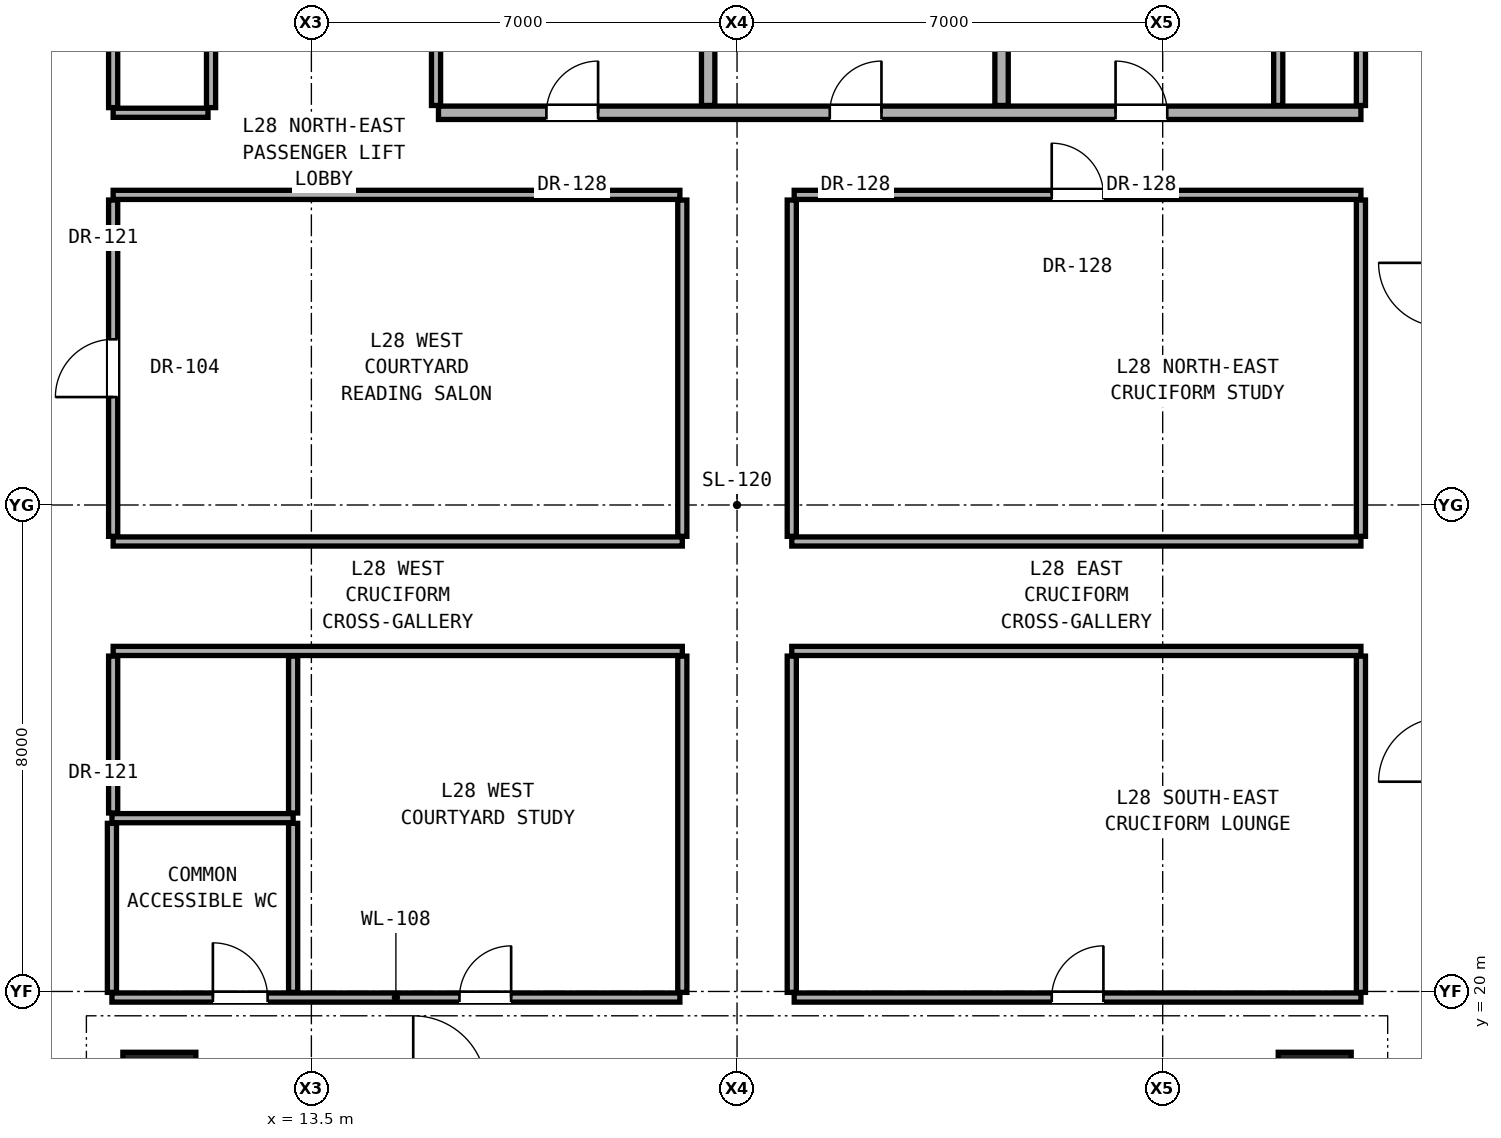
"""IFC4 building model, lengths in metres.
Left out: names, types, materials, properties, quantities, classifications, styles, units other than length and angle.
Written with IfcOpenShell. Run it as: python <this file> out.ifc"""

import sys

from ifc_helpers import new_model, si_unit, direction, frame, frame_2d, origin, origin_2d, place, context, subcontext, project, spatial, rectangle, extrude, element, fill, save


model = new_model("IFC4")
c1 = context("Model", 3, precision=1e-05, world=origin(), true_north=direction((0.0, 1.0)))
c2 = subcontext(c1, "Body", "Model", "MODEL_VIEW")
j1 = project(units=[si_unit("LENGTHUNIT", "METRE"), si_unit("PLANEANGLEUNIT", "RADIAN")], contexts=[c1])
p1 = place(None, origin())
s1 = spatial("IfcSite", under=j1, at=p1, CompositionType="ELEMENT")
p2 = place(p1, origin())
s2 = spatial("IfcBuilding", under=s1, at=p2, CompositionType="ELEMENT")
p3 = place(p2, frame((0.0, 0.0, 101.6)))
s3 = spatial("IfcBuildingStorey", under=s2, at=p3, CompositionType="ELEMENT", Elevation=101.6)
for number, where, z_axis, x_axis in (
    (1, (11.0, 18.4, 0.0), (0.0, 0.0, 1.0), (1.0, 0.0, 0.0)),
    (2, (30.0, 18.4, 0.0), (0.0, 0.0, 1.0), (1.0, 0.0, 0.0)),
):
    element("IfcColumn", number, at=place(p3, frame(where, z_axis=z_axis, x_axis=x_axis)), inside=s3, PredefinedType="COLUMN", context=c2, shape_type="SweptSolid", body=[
        extrude(rectangle(XDim=1.2, YDim=1.2, at=origin_2d()), origin(), (0.0, 0.0, 1.0), 3.3),
    ])
p4 = place(p3, frame((10.22, 19.9, 0.0), z_axis=(0.0, 0.0, 1.0), x_axis=(1.0, 0.0, 0.0)))
e3 = element("IfcWall", 3, at=p4, inside=s3, PredefinedType="PARTITIONING", context=c2, shape_type="SweptSolid", body=[
    extrude(rectangle(XDim=9.34, YDim=0.15, at=frame_2d((4.67, 0.0))), origin(), (0.0, 0.0, 1.0), 2.124),
])
p5 = place(p4, frame((1.66, 0.0, 0.0)))
e4 = element("IfcOpeningElement", 4, at=p5, cuts=e3, PredefinedType="OPENING", context=c2, shape_type="SweptSolid", body=[
    extrude(rectangle(XDim=0.9, YDim=2.1, at=frame_2d((0.45, 1.05))), frame((0.0, 0.085, 0.0), z_axis=(0.0, -1.0, 0.0), x_axis=(1.0, 0.0, 0.0)), (0.0, 0.0, 1.0), 0.17),
])
p6 = place(p4, frame((5.715, 0.0, 0.0)))
e5 = element("IfcOpeningElement", 5, at=p6, cuts=e3, PredefinedType="OPENING", context=c2, shape_type="SweptSolid", body=[
    extrude(rectangle(XDim=0.85, YDim=2.01, at=frame_2d((0.425, 1.005))), frame((0.0, 0.085, 0.0), z_axis=(0.0, -1.0, 0.0), x_axis=(1.0, 0.0, 0.0)), (0.0, 0.0, 1.0), 0.17),
])
p7 = place(p3, frame((21.44, 19.9, 0.0), z_axis=(0.0, 0.0, 1.0), x_axis=(1.0, 0.0, 0.0)))
e6 = element("IfcWall", 6, at=p7, inside=s3, PredefinedType="PARTITIONING", context=c2, shape_type="SweptSolid", body=[
    extrude(rectangle(XDim=9.32, YDim=0.15, at=frame_2d((4.66, 0.0))), origin(), (0.0, 0.0, 1.0), 2.124),
])
p8 = place(p7, frame((4.235, 0.0, 0.0)))
e7 = element("IfcOpeningElement", 7, at=p8, cuts=e6, PredefinedType="OPENING", context=c2, shape_type="SweptSolid", body=[
    extrude(rectangle(XDim=0.85, YDim=2.01, at=frame_2d((0.425, 1.005))), frame((0.0, 0.085, 0.0), z_axis=(0.0, -1.0, 0.0), x_axis=(1.0, 0.0, 0.0)), (0.0, 0.0, 1.0), 0.17),
])
p9 = place(p3, frame((10.22, 22.85, 0.0), z_axis=(0.0, 0.0, 1.0), x_axis=(1.0, 0.0, 0.0)))
e8 = element("IfcWall", 8, at=p9, inside=s3, PredefinedType="PARTITIONING", context=c2, shape_type="SweptSolid", body=[
    extrude(rectangle(XDim=2.98, YDim=0.15, at=frame_2d((1.49, 0.0))), origin(), (0.0, 0.0, 1.0), 2.124),
])
for number, where, z_axis, x_axis in (
    (9, (10.24, 25.6, 0.0), (0.0, 0.0, 1.0), (1.0, 0.0, 0.0)),
    (10, (21.4, 25.6, 0.0), (0.0, 0.0, 1.0), (1.0, 0.0, 0.0)),
    (11, (10.24, 27.4, 0.0), (0.0, 0.0, 1.0), (1.0, 0.0, 0.0)),
    (12, (21.4, 27.4, 0.0), (0.0, 0.0, 1.0), (1.0, 0.0, 0.0)),
):
    element("IfcWall", number, at=place(p3, frame(where, z_axis=z_axis, x_axis=x_axis)), inside=s3, PredefinedType="PARTITIONING", context=c2, shape_type="SweptSolid", body=[
        extrude(rectangle(XDim=9.36, YDim=0.15, at=frame_2d((4.68, 0.0))), origin(), (0.0, 0.0, 1.0), 2.124),
    ])
p10 = place(p3, frame((10.24, 33.1, 0.0), z_axis=(0.0, 0.0, 1.0), x_axis=(1.0, 0.0, 0.0)))
e13 = element("IfcWall", 13, at=p10, inside=s3, PredefinedType="PARTITIONING", context=c2, shape_type="SweptSolid", body=[
    extrude(rectangle(XDim=9.32, YDim=0.15, at=frame_2d((4.66, 0.0))), origin(), (0.0, 0.0, 1.0), 2.124),
])
p11 = place(p3, frame((21.44, 33.1, 0.0), z_axis=(0.0, 0.0, 1.0), x_axis=(1.0, 0.0, 0.0)))
e14 = element("IfcWall", 14, at=p11, inside=s3, PredefinedType="PARTITIONING", context=c2, shape_type="SweptSolid", body=[
    extrude(rectangle(XDim=9.32, YDim=0.15, at=frame_2d((4.66, 0.0))), origin(), (0.0, 0.0, 1.0), 2.124),
])
p12 = place(p11, frame((4.235, 0.0, 0.0)))
e15 = element("IfcOpeningElement", 15, at=p12, cuts=e14, PredefinedType="OPENING", context=c2, shape_type="SweptSolid", body=[
    extrude(rectangle(XDim=0.85, YDim=2.01, at=frame_2d((0.425, 1.005))), frame((0.0, 0.085, 0.0), z_axis=(0.0, -1.0, 0.0), x_axis=(1.0, 0.0, 0.0)), (0.0, 0.0, 1.0), 0.17),
])
p13 = place(p3, frame((10.24, 34.45, 0.0), z_axis=(0.0, 0.0, 1.0), x_axis=(1.0, 0.0, 0.0)))
e16 = element("IfcWall", 16, at=p13, inside=s3, PredefinedType="PARTITIONING", context=c2, shape_type="SweptSolid", body=[
    extrude(rectangle(XDim=1.56, YDim=0.15, at=frame_2d((0.78, 0.0))), origin(), (0.0, 0.0, 1.0), 2.124),
])
p14 = place(p3, frame((15.59, 34.45, 0.0), z_axis=(0.0, 0.0, 1.0), x_axis=(1.0, 0.0, 0.0)))
e17 = element("IfcWall", 17, at=p14, inside=s3, PredefinedType="SOLIDWALL", context=c2, shape_type="SweptSolid", body=[
    extrude(rectangle(XDim=15.17, YDim=0.22, at=frame_2d((7.585, 0.0))), origin(), (0.0, 0.0, 1.0), 2.124),
])
p15 = place(p14, frame((6.435, 0.0, 0.0)))
e18 = element("IfcOpeningElement", 18, at=p15, cuts=e17, PredefinedType="OPENING", context=c2, shape_type="SweptSolid", body=[
    extrude(rectangle(XDim=0.85, YDim=2.01, at=frame_2d((0.425, 1.005))), frame((0.0, 0.12, 0.0), z_axis=(0.0, -1.0, 0.0), x_axis=(1.0, 0.0, 0.0)), (0.0, 0.0, 1.0), 0.24),
])
p16 = place(p14, frame((11.135, 0.0, 0.0)))
e19 = element("IfcOpeningElement", 19, at=p16, cuts=e17, PredefinedType="OPENING", context=c2, shape_type="SweptSolid", body=[
    extrude(rectangle(XDim=0.85, YDim=2.01, at=frame_2d((0.425, 1.005))), frame((0.0, 0.12, 0.0), z_axis=(0.0, -1.0, 0.0), x_axis=(1.0, 0.0, 0.0)), (0.0, 0.0, 1.0), 0.24),
])
p17 = place(p14, frame((1.775, 0.0, 0.0)))
e20 = element("IfcOpeningElement", 20, at=p17, cuts=e17, PredefinedType="OPENING", context=c2, shape_type="SweptSolid", body=[
    extrude(rectangle(XDim=0.85, YDim=2.01, at=frame_2d((0.425, 1.005))), frame((0.0, 0.12, 0.0), z_axis=(0.0, -1.0, 0.0), x_axis=(1.0, 0.0, 0.0)), (0.0, 0.0, 1.0), 0.24),
])
p18 = place(p3, frame((10.22, 19.985, 0.0), z_axis=(0.0, 0.0, 1.0), x_axis=(0.0, 1.0, 0.0)))
e21 = element("IfcWall", 21, at=p18, inside=s3, PredefinedType="PARTITIONING", context=c2, shape_type="SweptSolid", body=[
    extrude(rectangle(XDim=2.78, YDim=0.15, at=frame_2d((1.39, 0.0))), origin(), (0.0, 0.0, 1.0), 3.08),
])
p19 = place(p3, frame((10.24, 22.935, 0.0), z_axis=(0.0, 0.0, 1.0), x_axis=(0.0, 1.0, 0.0)))
e22 = element("IfcWall", 22, at=p19, inside=s3, PredefinedType="PARTITIONING", context=c2, shape_type="SweptSolid", body=[
    extrude(rectangle(XDim=2.58, YDim=0.15, at=frame_2d((1.29, 0.0))), origin(), (0.0, 0.0, 1.0), 2.299),
])
p20 = place(p3, frame((10.24, 27.485, 0.0), z_axis=(0.0, 0.0, 1.0), x_axis=(0.0, 1.0, 0.0)))
e23 = element("IfcWall", 23, at=p20, inside=s3, PredefinedType="PARTITIONING", context=c2, shape_type="SweptSolid", body=[
    extrude(rectangle(XDim=5.53, YDim=0.15, at=frame_2d((2.765, 0.0))), origin(), (0.0, 0.0, 1.0), 2.299),
])
p21 = place(p20, frame((2.29, 0.0, 0.0)))
e24 = element("IfcOpeningElement", 24, at=p21, cuts=e23, PredefinedType="OPENING", context=c2, shape_type="SweptSolid", body=[
    extrude(rectangle(XDim=0.95, YDim=2.15, at=frame_2d((0.475, 1.075))), frame((0.0, 0.085, 0.0), z_axis=(0.0, -1.0, 0.0), x_axis=(1.0, 0.0, 0.0)), (0.0, 0.0, 1.0), 0.17),
])
p22 = place(p3, frame((10.24, 34.535, 0.0), z_axis=(0.0, 0.0, 1.0), x_axis=(0.0, 1.0, 0.0)))
e25 = element("IfcWall", 25, at=p22, inside=s3, PredefinedType="PARTITIONING", context=c2, shape_type="SweptSolid", body=[
    extrude(rectangle(XDim=9.13, YDim=0.15, at=frame_2d((4.565, 0.0))), origin(), (0.0, 0.0, 1.0), 2.456),
])
p23 = place(p3, frame((11.85, 34.535, 0.0), z_axis=(0.0, 0.0, 1.0), x_axis=(0.0, 1.0, 0.0)))
e26 = element("IfcWall", 26, at=p23, inside=s3, PredefinedType="PARTITIONING", context=c2, shape_type="SweptSolid", body=[
    extrude(rectangle(XDim=2.745, YDim=0.15, at=frame_2d((1.373, 0.0))), origin(), (0.0, 0.0, 1.0), 3.08),
])
p24 = place(p3, frame((13.2, 19.985, 0.0), z_axis=(0.0, 0.0, 1.0), x_axis=(0.0, 1.0, 0.0)))
e27 = element("IfcWall", 27, at=p24, inside=s3, PredefinedType="PARTITIONING", context=c2, shape_type="SweptSolid", body=[
    extrude(rectangle(XDim=2.78, YDim=0.15, at=frame_2d((1.39, 0.0))), origin(), (0.0, 0.0, 1.0), 3.08),
])
p25 = place(p3, frame((13.2, 22.935, 0.0), z_axis=(0.0, 0.0, 1.0), x_axis=(0.0, 1.0, 0.0)))
e28 = element("IfcWall", 28, at=p25, inside=s3, PredefinedType="PARTITIONING", context=c2, shape_type="SweptSolid", body=[
    extrude(rectangle(XDim=2.58, YDim=0.15, at=frame_2d((1.29, 0.0))), origin(), (0.0, 0.0, 1.0), 2.124),
])
p26 = place(p3, frame((15.55, 34.57, 0.0), z_axis=(0.0, 0.0, 1.0), x_axis=(0.0, 1.0, 0.0)))
e29 = element("IfcWall", 29, at=p26, inside=s3, PredefinedType="PARTITIONING", context=c2, shape_type="SweptSolid", body=[
    extrude(rectangle(XDim=2.71, YDim=0.15, at=frame_2d((1.355, 0.0))), origin(), (0.0, 0.0, 1.0), 2.609),
])
for number, where, z_axis, x_axis in (
    (30, (19.6, 19.985, 0.0), (0.0, 0.0, 1.0), (0.0, 1.0, 0.0)),
    (31, (19.6, 27.485, 0.0), (0.0, 0.0, 1.0), (0.0, 1.0, 0.0)),
):
    element("IfcWall", number, at=place(p3, frame(where, z_axis=z_axis, x_axis=x_axis)), inside=s3, PredefinedType="PARTITIONING", context=c2, shape_type="SweptSolid", body=[
        extrude(rectangle(XDim=5.53, YDim=0.15, at=frame_2d((2.765, 0.0))), origin(), (0.0, 0.0, 1.0), 2.124),
    ])
p27 = place(p3, frame((20.025, 34.57, 0.0), z_axis=(0.0, 0.0, 1.0), x_axis=(0.0, 1.0, 0.0)))
e32 = element("IfcWall", 32, at=p27, inside=s3, PredefinedType="SOLIDWALL", context=c2, shape_type="SweptSolid", body=[
    extrude(rectangle(XDim=2.71, YDim=0.22, at=frame_2d((1.355, 0.0))), origin(), (0.0, 0.0, 1.0), 3.08),
])
for number, where, z_axis, x_axis in (
    (33, (21.4, 19.985, 0.0), (0.0, 0.0, 1.0), (0.0, 1.0, 0.0)),
    (34, (21.4, 27.485, 0.0), (0.0, 0.0, 1.0), (0.0, 1.0, 0.0)),
):
    element("IfcWall", number, at=place(p3, frame(where, z_axis=z_axis, x_axis=x_axis)), inside=s3, PredefinedType="PARTITIONING", context=c2, shape_type="SweptSolid", body=[
        extrude(rectangle(XDim=5.53, YDim=0.15, at=frame_2d((2.765, 0.0))), origin(), (0.0, 0.0, 1.0), 2.124),
    ])
p28 = place(p3, frame((24.85, 34.57, 0.0), z_axis=(0.0, 0.0, 1.0), x_axis=(0.0, 1.0, 0.0)))
e35 = element("IfcWall", 35, at=p28, inside=s3, PredefinedType="SOLIDWALL", context=c2, shape_type="SweptSolid", body=[
    extrude(rectangle(XDim=2.71, YDim=0.22, at=frame_2d((1.355, 0.0))), origin(), (0.0, 0.0, 1.0), 3.08),
])
p29 = place(p3, frame((29.4, 34.57, 0.0), z_axis=(0.0, 0.0, 1.0), x_axis=(0.0, 1.0, 0.0)))
e36 = element("IfcWall", 36, at=p29, inside=s3, PredefinedType="PARTITIONING", context=c2, shape_type="SweptSolid", body=[
    extrude(rectangle(XDim=2.71, YDim=0.15, at=frame_2d((1.355, 0.0))), origin(), (0.0, 0.0, 1.0), 3.08),
])
for number, where, z_axis, x_axis in (
    (37, (30.76, 19.985, 0.0), (0.0, 0.0, 1.0), (0.0, 1.0, 0.0)),
    (38, (30.76, 27.485, 0.0), (0.0, 0.0, 1.0), (0.0, 1.0, 0.0)),
):
    element("IfcWall", number, at=place(p3, frame(where, z_axis=z_axis, x_axis=x_axis)), inside=s3, PredefinedType="PARTITIONING", context=c2, shape_type="SweptSolid", body=[
        extrude(rectangle(XDim=5.53, YDim=0.15, at=frame_2d((2.765, 0.0))), origin(), (0.0, 0.0, 1.0), 2.299),
    ])
p30 = place(p3, frame((30.76, 34.57, 0.0), z_axis=(0.0, 0.0, 1.0), x_axis=(0.0, 1.0, 0.0)))
e39 = element("IfcWall", 39, at=p30, inside=s3, PredefinedType="PARTITIONING", context=c2, shape_type="SweptSolid", body=[
    extrude(rectangle(XDim=9.095, YDim=0.15, at=frame_2d((4.547, 0.0))), origin(), (0.0, 0.0, 1.0), 2.456),
])
p31 = place(p15, origin())
e40 = element("IfcDoor", 40, at=p31, inside=s3, OperationType="SINGLE_SWING_RIGHT", PredefinedType="DOOR", context=c2, shape_type="SweptSolid", body=[
    extrude(rectangle(XDim=0.85, YDim=2.01, at=frame_2d((0.425, 1.005))), frame((0.0, 0.025, 0.0), z_axis=(0.0, -1.0, 0.0), x_axis=(1.0, 0.0, 0.0)), (0.0, 0.0, 1.0), 0.05),
])
fill(e18, e40)
p32 = place(p16, origin())
e41 = element("IfcDoor", 41, at=p32, inside=s3, OperationType="SINGLE_SWING_LEFT", PredefinedType="DOOR", context=c2, shape_type="SweptSolid", body=[
    extrude(rectangle(XDim=0.85, YDim=2.01, at=frame_2d((0.425, 1.005))), frame((0.0, 0.025, 0.0), z_axis=(0.0, -1.0, 0.0), x_axis=(1.0, 0.0, 0.0)), (0.0, 0.0, 1.0), 0.05),
])
fill(e19, e41)
p33 = place(p17, origin())
e42 = element("IfcDoor", 42, at=p33, inside=s3, OperationType="SINGLE_SWING_RIGHT", PredefinedType="DOOR", context=c2, shape_type="SweptSolid", body=[
    extrude(rectangle(XDim=0.85, YDim=2.01, at=frame_2d((0.425, 1.005))), frame((0.0, 0.025, 0.0), z_axis=(0.0, -1.0, 0.0), x_axis=(1.0, 0.0, 0.0)), (0.0, 0.0, 1.0), 0.05),
])
fill(e20, e42)
p34 = place(p5, origin())
e43 = element("IfcDoor", 43, at=p34, inside=s3, OperationType="SINGLE_SWING_LEFT", PredefinedType="DOOR", context=c2, shape_type="SweptSolid", body=[
    extrude(rectangle(XDim=0.9, YDim=2.1, at=frame_2d((0.45, 1.05))), frame((0.0, 0.025, 0.0), z_axis=(0.0, -1.0, 0.0), x_axis=(1.0, 0.0, 0.0)), (0.0, 0.0, 1.0), 0.05),
])
fill(e4, e43)
p35 = place(p6, origin())
e44 = element("IfcDoor", 44, at=p35, inside=s3, OperationType="SINGLE_SWING_RIGHT", PredefinedType="DOOR", context=c2, shape_type="SweptSolid", body=[
    extrude(rectangle(XDim=0.85, YDim=2.01, at=frame_2d((0.425, 1.005))), frame((0.0, 0.025, 0.0), z_axis=(0.0, -1.0, 0.0), x_axis=(1.0, 0.0, 0.0)), (0.0, 0.0, 1.0), 0.05),
])
fill(e5, e44)
p36 = place(p21, origin())
e45 = element("IfcDoor", 45, at=p36, inside=s3, OperationType="SINGLE_SWING_LEFT", PredefinedType="DOOR", context=c2, shape_type="SweptSolid", body=[
    extrude(rectangle(XDim=0.95, YDim=2.15, at=frame_2d((0.475, 1.075))), frame((0.0, 0.025, 0.0), z_axis=(0.0, -1.0, 0.0), x_axis=(1.0, 0.0, 0.0)), (0.0, 0.0, 1.0), 0.05),
])
fill(e24, e45)
p37 = place(p8, origin())
e46 = element("IfcDoor", 46, at=p37, inside=s3, OperationType="SINGLE_SWING_RIGHT", PredefinedType="DOOR", context=c2, shape_type="SweptSolid", body=[
    extrude(rectangle(XDim=0.85, YDim=2.01, at=frame_2d((0.425, 1.005))), frame((0.0, 0.025, 0.0), z_axis=(0.0, -1.0, 0.0), x_axis=(1.0, 0.0, 0.0)), (0.0, 0.0, 1.0), 0.05),
])
fill(e7, e46)
p38 = place(p12, origin())
e47 = element("IfcDoor", 47, at=p38, inside=s3, OperationType="SINGLE_SWING_LEFT", PredefinedType="DOOR", context=c2, shape_type="SweptSolid", body=[
    extrude(rectangle(XDim=0.85, YDim=2.01, at=frame_2d((0.425, 1.005))), frame((0.0, 0.025, 0.0), z_axis=(0.0, -1.0, 0.0), x_axis=(1.0, 0.0, 0.0)), (0.0, 0.0, 1.0), 0.05),
])
fill(e15, e47)
save(model, sys.argv[1])
